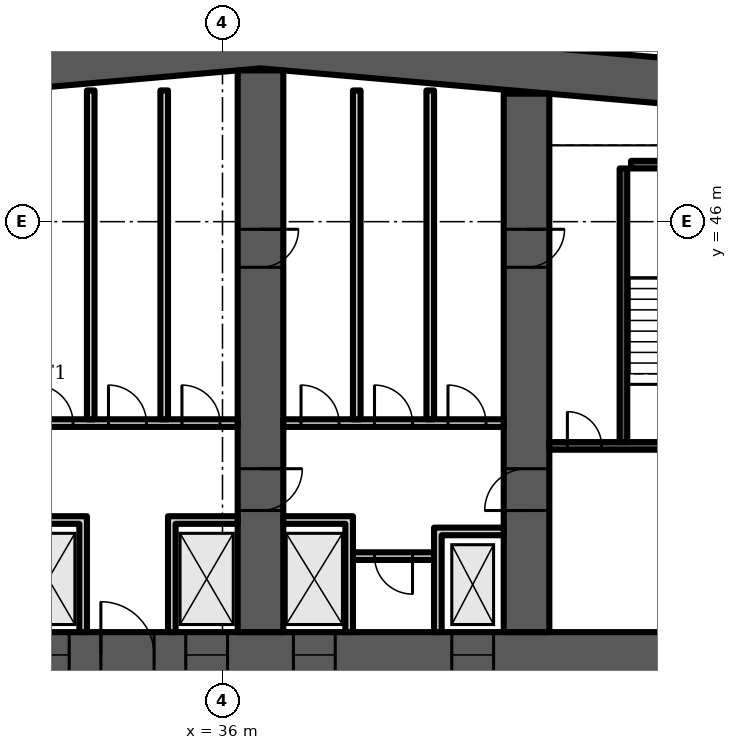
"""IFC4 building model, lengths in metres.
Left out: names, types, materials, properties, quantities, classifications, styles, units other than length and angle.
Written with IfcOpenShell. Run it as: python <this file> out.ifc"""

import sys

from ifc_helpers import new_model, si_unit, direction, frame, frame_2d, origin, place, context, subcontext, project, spatial, polyline, rectangle, outline, extrude, element, fill, save


model = new_model("IFC4")
c1 = context("Model", 3, precision=1e-05, world=origin(), true_north=direction((0.0, 1.0)))
c2 = subcontext(c1, "Body", "Model", "MODEL_VIEW")
j1 = project(units=[si_unit("LENGTHUNIT", "METRE"), si_unit("PLANEANGLEUNIT", "RADIAN")], contexts=[c1])
p1 = place(None, origin())
s1 = spatial("IfcSite", under=j1, at=p1, CompositionType="ELEMENT")
p2 = place(p1, origin())
s2 = spatial("IfcBuilding", under=s1, at=p2, CompositionType="ELEMENT")
p3 = place(p2, frame((0.0, 0.0, 63.1)))
s3 = spatial("IfcBuildingStorey", under=s2, at=p3, CompositionType="ELEMENT", Elevation=63.1)
p4 = place(p3, frame((0.0, 0.0, -0.0)))
e1 = element("IfcWall", 1, at=p4, inside=s3, PredefinedType="SHEAR", context=c2, shape_type="SweptSolid", body=[
    extrude(outline(polyline([(9.0, 47.583), (37.0, 50.032), (65.0, 47.583), (65.0, 48.787), (37.0, 51.237), (9.0, 48.787), (9.0, 47.583)])), origin(), (0.0, 0.0, 1.0), 3.6),
])
p5 = place(p3, frame((9.0, 34.6, 0.0), z_axis=(0.0, 0.0, 1.0), x_axis=(1.0, 0.0, 0.0)))
e2 = element("IfcWall", 2, at=p5, inside=s3, PredefinedType="SHEAR", context=c2, shape_type="SweptSolid", body=[
    extrude(rectangle(XDim=56.0, YDim=1.2, at=frame_2d((28.0, 0.0))), origin(), (0.0, 0.0, 1.0), 3.6),
])
p6 = place(p5, frame((3.3, 0.0, 0.0)))
e3 = element("IfcOpeningElement", 3, at=p6, cuts=e2, PredefinedType="OPENING", context=c2, shape_type="SweptSolid", body=[
    extrude(rectangle(XDim=1.0, YDim=2.1, at=frame_2d((0.5, 1.05))), frame((0.0, 0.61, 0.0), z_axis=(0.0, -1.0, 0.0), x_axis=(1.0, 0.0, 0.0)), (0.0, 0.0, 1.0), 1.22),
])
p7 = place(p5, frame((7.867, 0.0, 0.0)))
e4 = element("IfcOpeningElement", 4, at=p7, cuts=e2, PredefinedType="OPENING", context=c2, shape_type="SweptSolid", body=[
    extrude(rectangle(XDim=1.1, YDim=2.1, at=frame_2d((0.55, 1.05))), frame((0.0, 0.61, 0.0), z_axis=(0.0, -1.0, 0.0), x_axis=(1.0, 0.0, 0.0)), (0.0, 0.0, 1.0), 1.22),
])
p8 = place(p5, frame((12.033, 0.0, 0.0)))
e5 = element("IfcOpeningElement", 5, at=p8, cuts=e2, PredefinedType="OPENING", context=c2, shape_type="SweptSolid", body=[
    extrude(rectangle(XDim=1.1, YDim=2.1, at=frame_2d((0.55, 1.05))), frame((0.0, 0.61, 0.0), z_axis=(0.0, -1.0, 0.0), x_axis=(1.0, 0.0, 0.0)), (0.0, 0.0, 1.0), 1.22),
])
p9 = place(p5, frame((9.8, 0.0, 0.0)))
e6 = element("IfcOpeningElement", 6, at=p9, cuts=e2, PredefinedType="OPENING", context=c2, shape_type="SweptSolid", body=[
    extrude(rectangle(XDim=1.4, YDim=2.1, at=frame_2d((0.7, 1.05))), frame((0.0, 0.61, 0.0), z_axis=(0.0, -1.0, 0.0), x_axis=(1.0, 0.0, 0.0)), (0.0, 0.0, 1.0), 1.22),
])
p10 = place(p5, frame((14.65, 0.0, 0.0)))
e7 = element("IfcOpeningElement", 7, at=p10, cuts=e2, PredefinedType="OPENING", context=c2, shape_type="SweptSolid", body=[
    extrude(rectangle(XDim=1.2, YDim=2.1, at=frame_2d((0.6, 1.05))), frame((0.0, 0.61, 0.0), z_axis=(0.0, -1.0, 0.0), x_axis=(1.0, 0.0, 0.0)), (0.0, 0.0, 1.0), 1.22),
])
p11 = place(p5, frame((21.867, 0.0, 0.0)))
e8 = element("IfcOpeningElement", 8, at=p11, cuts=e2, PredefinedType="OPENING", context=c2, shape_type="SweptSolid", body=[
    extrude(rectangle(XDim=1.1, YDim=2.1, at=frame_2d((0.55, 1.05))), frame((0.0, 0.61, 0.0), z_axis=(0.0, -1.0, 0.0), x_axis=(1.0, 0.0, 0.0)), (0.0, 0.0, 1.0), 1.22),
])
p12 = place(p5, frame((26.033, 0.0, 0.0)))
e9 = element("IfcOpeningElement", 9, at=p12, cuts=e2, PredefinedType="OPENING", context=c2, shape_type="SweptSolid", body=[
    extrude(rectangle(XDim=1.1, YDim=2.1, at=frame_2d((0.55, 1.05))), frame((0.0, 0.61, 0.0), z_axis=(0.0, -1.0, 0.0), x_axis=(1.0, 0.0, 0.0)), (0.0, 0.0, 1.0), 1.22),
])
p13 = place(p5, frame((23.8, 0.0, 0.0)))
e10 = element("IfcOpeningElement", 10, at=p13, cuts=e2, PredefinedType="OPENING", context=c2, shape_type="SweptSolid", body=[
    extrude(rectangle(XDim=1.4, YDim=2.1, at=frame_2d((0.7, 1.05))), frame((0.0, 0.61, 0.0), z_axis=(0.0, -1.0, 0.0), x_axis=(1.0, 0.0, 0.0)), (0.0, 0.0, 1.0), 1.22),
])
p14 = place(p5, frame((28.867, 0.0, 0.0)))
e11 = element("IfcOpeningElement", 11, at=p14, cuts=e2, PredefinedType="OPENING", context=c2, shape_type="SweptSolid", body=[
    extrude(rectangle(XDim=1.1, YDim=2.1, at=frame_2d((0.55, 1.05))), frame((0.0, 0.61, 0.0), z_axis=(0.0, -1.0, 0.0), x_axis=(1.0, 0.0, 0.0)), (0.0, 0.0, 1.0), 1.22),
])
p15 = place(p5, frame((33.033, 0.0, 0.0)))
e12 = element("IfcOpeningElement", 12, at=p15, cuts=e2, PredefinedType="OPENING", context=c2, shape_type="SweptSolid", body=[
    extrude(rectangle(XDim=1.1, YDim=2.1, at=frame_2d((0.55, 1.05))), frame((0.0, 0.61, 0.0), z_axis=(0.0, -1.0, 0.0), x_axis=(1.0, 0.0, 0.0)), (0.0, 0.0, 1.0), 1.22),
])
p16 = place(p5, frame((40.15, 0.0, 0.0)))
e13 = element("IfcOpeningElement", 13, at=p16, cuts=e2, PredefinedType="OPENING", context=c2, shape_type="SweptSolid", body=[
    extrude(rectangle(XDim=1.2, YDim=2.1, at=frame_2d((0.6, 1.05))), frame((0.0, 0.61, 0.0), z_axis=(0.0, -1.0, 0.0), x_axis=(1.0, 0.0, 0.0)), (0.0, 0.0, 1.0), 1.22),
])
p17 = place(p5, frame((44.8, 0.0, 0.0)))
e14 = element("IfcOpeningElement", 14, at=p17, cuts=e2, PredefinedType="OPENING", context=c2, shape_type="SweptSolid", body=[
    extrude(rectangle(XDim=1.4, YDim=2.1, at=frame_2d((0.7, 1.05))), frame((0.0, 0.61, 0.0), z_axis=(0.0, -1.0, 0.0), x_axis=(1.0, 0.0, 0.0)), (0.0, 0.0, 1.0), 1.22),
])
p18 = place(p5, frame((49.867, 0.0, 0.0)))
e15 = element("IfcOpeningElement", 15, at=p18, cuts=e2, PredefinedType="OPENING", context=c2, shape_type="SweptSolid", body=[
    extrude(rectangle(XDim=1.1, YDim=2.1, at=frame_2d((0.55, 1.05))), frame((0.0, 0.61, 0.0), z_axis=(0.0, -1.0, 0.0), x_axis=(1.0, 0.0, 0.0)), (0.0, 0.0, 1.0), 1.22),
])
p19 = place(p5, frame((53.5, 0.0, 0.0)))
e16 = element("IfcOpeningElement", 16, at=p19, cuts=e2, PredefinedType="OPENING", context=c2, shape_type="SweptSolid", body=[
    extrude(rectangle(XDim=1.1, YDim=2.1, at=frame_2d((0.55, 1.05))), frame((0.0, 0.61, 0.0), z_axis=(0.0, -1.0, 0.0), x_axis=(1.0, 0.0, 0.0)), (0.0, 0.0, 1.0), 1.22),
])
p20 = place(p5, frame((51.567, 0.0, 0.0)))
e17 = element("IfcOpeningElement", 17, at=p20, cuts=e2, PredefinedType="OPENING", context=c2, shape_type="SweptSolid", body=[
    extrude(rectangle(XDim=1.4, YDim=2.1, at=frame_2d((0.7, 1.05))), frame((0.0, 0.61, 0.0), z_axis=(0.0, -1.0, 0.0), x_axis=(1.0, 0.0, 0.0)), (0.0, 0.0, 1.0), 1.22),
])
p21 = place(p3, frame((37.0, 35.2, 0.0), z_axis=(0.0, 0.0, 1.0), x_axis=(0.0, 1.0, 0.0)))
e18 = element("IfcWall", 18, at=p21, inside=s3, PredefinedType="SHEAR", context=c2, shape_type="SweptSolid", body=[
    extrude(rectangle(XDim=14.78, YDim=1.2, at=frame_2d((7.39, 0.0))), origin(), (0.0, 0.0, 1.0), 3.6),
])
p22 = place(p21, frame((3.2, 0.0, 0.0)))
e19 = element("IfcOpeningElement", 19, at=p22, cuts=e18, PredefinedType="OPENING", context=c2, shape_type="SweptSolid", body=[
    extrude(rectangle(XDim=1.1, YDim=2.1, at=frame_2d((0.55, 1.05))), frame((0.0, 0.61, 0.0), z_axis=(0.0, -1.0, 0.0), x_axis=(1.0, 0.0, 0.0)), (0.0, 0.0, 1.0), 1.22),
])
p23 = place(p21, frame((9.6, 0.0, 0.0)))
e20 = element("IfcOpeningElement", 20, at=p23, cuts=e18, PredefinedType="OPENING", context=c2, shape_type="SweptSolid", body=[
    extrude(rectangle(XDim=1.0, YDim=2.1, at=frame_2d((0.5, 1.05))), frame((0.0, 0.61, 0.0), z_axis=(0.0, -1.0, 0.0), x_axis=(1.0, 0.0, 0.0)), (0.0, 0.0, 1.0), 1.22),
])
p24 = place(p3, frame((44.0, 35.2, 0.0), z_axis=(0.0, 0.0, 1.0), x_axis=(0.0, 1.0, 0.0)))
e21 = element("IfcWall", 21, at=p24, inside=s3, PredefinedType="SHEAR", context=c2, shape_type="SweptSolid", body=[
    extrude(rectangle(XDim=14.168, YDim=1.2, at=frame_2d((7.084, 0.0))), origin(), (0.0, 0.0, 1.0), 3.6),
])
p25 = place(p24, frame((3.2, 0.0, 0.0)))
e22 = element("IfcOpeningElement", 22, at=p25, cuts=e21, PredefinedType="OPENING", context=c2, shape_type="SweptSolid", body=[
    extrude(rectangle(XDim=1.1, YDim=2.1, at=frame_2d((0.55, 1.05))), frame((0.0, 0.61, 0.0), z_axis=(0.0, -1.0, 0.0), x_axis=(1.0, 0.0, 0.0)), (0.0, 0.0, 1.0), 1.22),
])
p26 = place(p24, frame((9.6, 0.0, 0.0)))
e23 = element("IfcOpeningElement", 23, at=p26, cuts=e21, PredefinedType="OPENING", context=c2, shape_type="SweptSolid", body=[
    extrude(rectangle(XDim=1.0, YDim=2.1, at=frame_2d((0.5, 1.05))), frame((0.0, 0.61, 0.0), z_axis=(0.0, -1.0, 0.0), x_axis=(1.0, 0.0, 0.0)), (0.0, 0.0, 1.0), 1.22),
])
p27 = place(p3, frame((30.6, 40.7, 0.0), z_axis=(0.0, 0.0, 1.0), x_axis=(1.0, 0.0, 0.0)))
e24 = element("IfcWall", 24, at=p27, inside=s3, PredefinedType="PARTITIONING", context=c2, shape_type="SweptSolid", body=[
    extrude(rectangle(XDim=5.8, YDim=0.2, at=frame_2d((2.9, 0.0))), origin(), (0.0, 0.0, 1.0), 3.2),
])
p28 = place(p27, frame((0.467, 0.0, 0.0)))
e25 = element("IfcOpeningElement", 25, at=p28, cuts=e24, PredefinedType="OPENING", context=c2, shape_type="SweptSolid", body=[
    extrude(rectangle(XDim=1.0, YDim=2.1, at=frame_2d((0.5, 1.05))), frame((0.0, 0.11, 0.0), z_axis=(0.0, -1.0, 0.0), x_axis=(1.0, 0.0, 0.0)), (0.0, 0.0, 1.0), 0.22),
])
p29 = place(p27, frame((2.4, 0.0, 0.0)))
e26 = element("IfcOpeningElement", 26, at=p29, cuts=e24, PredefinedType="OPENING", context=c2, shape_type="SweptSolid", body=[
    extrude(rectangle(XDim=1.0, YDim=2.1, at=frame_2d((0.5, 1.05))), frame((0.0, 0.11, 0.0), z_axis=(0.0, -1.0, 0.0), x_axis=(1.0, 0.0, 0.0)), (0.0, 0.0, 1.0), 0.22),
])
p30 = place(p27, frame((4.333, 0.0, 0.0)))
e27 = element("IfcOpeningElement", 27, at=p30, cuts=e24, PredefinedType="OPENING", context=c2, shape_type="SweptSolid", body=[
    extrude(rectangle(XDim=1.0, YDim=2.1, at=frame_2d((0.5, 1.05))), frame((0.0, 0.11, 0.0), z_axis=(0.0, -1.0, 0.0), x_axis=(1.0, 0.0, 0.0)), (0.0, 0.0, 1.0), 0.22),
])
p31 = place(p3, frame((0.0, 0.0, -0.0)))
e28 = element("IfcWall", 28, at=p31, inside=s3, PredefinedType="PARTITIONING", context=c2, shape_type="SweptSolid", body=[
    extrude(outline(polyline([(32.233, 38.05), (30.6, 38.05), (30.6, 38.25), (32.233, 38.25), (32.433, 38.25), (32.433, 35.2), (32.233, 35.2), (32.233, 38.05)])), origin(), (0.0, 0.0, 1.0), 3.2),
])
p32 = place(p3, frame((0.0, 0.0, -0.0)))
e29 = element("IfcWall", 29, at=p32, inside=s3, PredefinedType="PARTITIONING", context=c2, shape_type="SweptSolid", body=[
    extrude(outline(polyline([(34.567, 38.25), (34.767, 38.25), (36.4, 38.25), (36.4, 38.05), (34.767, 38.05), (34.767, 35.2), (34.567, 35.2), (34.567, 38.25)])), origin(), (0.0, 0.0, 1.0), 3.2),
])
for number, where, z_axis, x_axis in (
    (30, (32.533, 40.8, 0.0), (0.0, 0.0, 1.0), (0.0, 1.0, 0.0)),
    (31, (34.467, 40.8, 0.0), (0.0, 0.0, 1.0), (0.0, 1.0, 0.0)),
):
    element("IfcWall", number, at=place(p3, frame(where, z_axis=z_axis, x_axis=x_axis)), inside=s3, PredefinedType="PARTITIONING", context=c2, shape_type="SweptSolid", body=[
        extrude(rectangle(XDim=8.653, YDim=0.2, at=frame_2d((4.326, 0.0))), origin(), (0.0, 0.0, 1.0), 3.2),
    ])
p33 = place(p3, frame((39.433, 37.2, 0.0), z_axis=(0.0, 0.0, 1.0), x_axis=(1.0, 0.0, 0.0)))
e32 = element("IfcWall", 32, at=p33, inside=s3, PredefinedType="PARTITIONING", context=c2, shape_type="SweptSolid", body=[
    extrude(rectangle(XDim=2.133, YDim=0.2, at=frame_2d((1.067, 0.0))), origin(), (0.0, 0.0, 1.0), 3.2),
])
p34 = place(p33, frame((0.567, 0.0, 0.0)))
e33 = element("IfcOpeningElement", 33, at=p34, cuts=e32, PredefinedType="OPENING", context=c2, shape_type="SweptSolid", body=[
    extrude(rectangle(XDim=1.0, YDim=2.1, at=frame_2d((0.5, 1.05))), frame((0.0, 0.11, 0.0), z_axis=(0.0, -1.0, 0.0), x_axis=(1.0, 0.0, 0.0)), (0.0, 0.0, 1.0), 0.22),
])
p35 = place(p3, frame((37.6, 40.7, 0.0), z_axis=(0.0, 0.0, 1.0), x_axis=(1.0, 0.0, 0.0)))
e34 = element("IfcWall", 34, at=p35, inside=s3, PredefinedType="PARTITIONING", context=c2, shape_type="SweptSolid", body=[
    extrude(rectangle(XDim=5.8, YDim=0.2, at=frame_2d((2.9, 0.0))), origin(), (0.0, 0.0, 1.0), 3.2),
])
p36 = place(p35, frame((0.467, 0.0, 0.0)))
e35 = element("IfcOpeningElement", 35, at=p36, cuts=e34, PredefinedType="OPENING", context=c2, shape_type="SweptSolid", body=[
    extrude(rectangle(XDim=1.0, YDim=2.1, at=frame_2d((0.5, 1.05))), frame((0.0, 0.11, 0.0), z_axis=(0.0, -1.0, 0.0), x_axis=(1.0, 0.0, 0.0)), (0.0, 0.0, 1.0), 0.22),
])
p37 = place(p35, frame((2.4, 0.0, 0.0)))
e36 = element("IfcOpeningElement", 36, at=p37, cuts=e34, PredefinedType="OPENING", context=c2, shape_type="SweptSolid", body=[
    extrude(rectangle(XDim=1.0, YDim=2.1, at=frame_2d((0.5, 1.05))), frame((0.0, 0.11, 0.0), z_axis=(0.0, -1.0, 0.0), x_axis=(1.0, 0.0, 0.0)), (0.0, 0.0, 1.0), 0.22),
])
p38 = place(p35, frame((4.333, 0.0, 0.0)))
e37 = element("IfcOpeningElement", 37, at=p38, cuts=e34, PredefinedType="OPENING", context=c2, shape_type="SweptSolid", body=[
    extrude(rectangle(XDim=1.0, YDim=2.1, at=frame_2d((0.5, 1.05))), frame((0.0, 0.11, 0.0), z_axis=(0.0, -1.0, 0.0), x_axis=(1.0, 0.0, 0.0)), (0.0, 0.0, 1.0), 0.22),
])
p39 = place(p3, frame((0.0, 0.0, -0.0)))
e38 = element("IfcWall", 38, at=p39, inside=s3, PredefinedType="PARTITIONING", context=c2, shape_type="SweptSolid", body=[
    extrude(outline(polyline([(41.567, 37.95), (41.767, 37.95), (43.4, 37.95), (43.4, 37.75), (41.767, 37.75), (41.767, 35.2), (41.567, 35.2), (41.567, 37.95)])), origin(), (0.0, 0.0, 1.0), 3.2),
])
p40 = place(p3, frame((0.0, 0.0, -0.0)))
e39 = element("IfcWall", 39, at=p40, inside=s3, PredefinedType="PARTITIONING", context=c2, shape_type="SweptSolid", body=[
    extrude(outline(polyline([(39.233, 38.05), (37.6, 38.05), (37.6, 38.25), (39.233, 38.25), (39.433, 38.25), (39.433, 35.2), (39.233, 35.2), (39.233, 38.05)])), origin(), (0.0, 0.0, 1.0), 3.2),
])
for number, where, z_axis, x_axis in (
    (40, (39.533, 40.8, 0.0), (0.0, 0.0, 1.0), (0.0, 1.0, 0.0)),
    (41, (41.467, 40.8, 0.0), (0.0, 0.0, 1.0), (0.0, 1.0, 0.0)),
):
    element("IfcWall", number, at=place(p3, frame(where, z_axis=z_axis, x_axis=x_axis)), inside=s3, PredefinedType="PARTITIONING", context=c2, shape_type="SweptSolid", body=[
        extrude(rectangle(XDim=8.653, YDim=0.2, at=frame_2d((4.326, 0.0))), origin(), (0.0, 0.0, 1.0), 3.2),
    ])
p41 = place(p3, frame((44.6, 40.1, 0.0), z_axis=(0.0, 0.0, 1.0), x_axis=(1.0, 0.0, 0.0)))
e42 = element("IfcWall", 42, at=p41, inside=s3, PredefinedType="SHEAR", context=c2, shape_type="SweptSolid", body=[
    extrude(rectangle(XDim=5.8, YDim=0.2, at=frame_2d((2.9, 0.0))), origin(), (0.0, 0.0, 1.0), 3.2),
])
p42 = place(p41, frame((3.325, 0.0, 0.0)))
e43 = element("IfcOpeningElement", 43, at=p42, cuts=e42, PredefinedType="OPENING", context=c2, shape_type="SweptSolid", body=[
    extrude(rectangle(XDim=1.2, YDim=2.1, at=frame_2d((0.6, 1.05))), frame((0.0, 0.11, 0.0), z_axis=(0.0, -1.0, 0.0), x_axis=(1.0, 0.0, 0.0)), (0.0, 0.0, 1.0), 0.22),
])
p43 = place(p41, frame((0.475, 0.0, 0.0)))
e44 = element("IfcOpeningElement", 44, at=p43, cuts=e42, PredefinedType="OPENING", context=c2, shape_type="SweptSolid", body=[
    extrude(rectangle(XDim=0.9, YDim=2.1, at=frame_2d((0.45, 1.05))), frame((0.0, 0.11, 0.0), z_axis=(0.0, -1.0, 0.0), x_axis=(1.0, 0.0, 0.0)), (0.0, 0.0, 1.0), 0.22),
])
p44 = place(p3, frame((46.55, 40.2, 0.0), z_axis=(0.0, 0.0, 1.0), x_axis=(0.0, 1.0, 0.0)))
e45 = element("IfcWall", 45, at=p44, inside=s3, PredefinedType="SHEAR", context=c2, shape_type="SweptSolid", body=[
    extrude(rectangle(XDim=7.2, YDim=0.2, at=frame_2d((3.6, 0.0))), origin(), (0.0, 0.0, 1.0), 3.2),
])
p45 = place(p3, frame((46.75, 47.5, 0.0), z_axis=(0.0, 0.0, 1.0), x_axis=(1.0, 0.0, 0.0)))
e46 = element("IfcWall", 46, at=p45, inside=s3, PredefinedType="SHEAR", context=c2, shape_type="SweptSolid", body=[
    extrude(rectangle(XDim=3.65, YDim=0.2, at=frame_2d((1.825, 0.0))), origin(), (0.0, 0.0, 1.0), 3.2),
])
p46 = place(p11, origin())
e47 = element("IfcDoor", 47, at=p46, inside=s3, OperationType="DOUBLE_DOOR_SLIDING", PredefinedType="DOOR", context=c2, shape_type="SweptSolid", body=[
    extrude(rectangle(XDim=1.1, YDim=2.1, at=frame_2d((0.55, 1.05))), frame((0.0, 0.025, 0.0), z_axis=(0.0, -1.0, 0.0), x_axis=(1.0, 0.0, 0.0)), (0.0, 0.0, 1.0), 0.05),
])
fill(e8, e47)
p47 = place(p12, origin())
e48 = element("IfcDoor", 48, at=p47, inside=s3, OperationType="DOUBLE_DOOR_SLIDING", PredefinedType="DOOR", context=c2, shape_type="SweptSolid", body=[
    extrude(rectangle(XDim=1.1, YDim=2.1, at=frame_2d((0.55, 1.05))), frame((0.0, 0.025, 0.0), z_axis=(0.0, -1.0, 0.0), x_axis=(1.0, 0.0, 0.0)), (0.0, 0.0, 1.0), 0.05),
])
fill(e9, e48)
p48 = place(p13, origin())
e49 = element("IfcDoor", 49, at=p48, inside=s3, OperationType="DOUBLE_DOOR_SINGLE_SWING", PredefinedType="DOOR", context=c2, shape_type="SweptSolid", body=[
    extrude(rectangle(XDim=1.4, YDim=2.1, at=frame_2d((0.7, 1.05))), frame((0.0, 0.025, 0.0), z_axis=(0.0, -1.0, 0.0), x_axis=(1.0, 0.0, 0.0)), (0.0, 0.0, 1.0), 0.05),
])
fill(e10, e49)
p49 = place(p28, origin())
e50 = element("IfcDoor", 50, at=p49, inside=s3, OperationType="SINGLE_SWING_LEFT", PredefinedType="DOOR", context=c2, shape_type="SweptSolid", body=[
    extrude(rectangle(XDim=1.0, YDim=2.1, at=frame_2d((0.5, 1.05))), frame((0.0, 0.025, 0.0), z_axis=(0.0, -1.0, 0.0), x_axis=(1.0, 0.0, 0.0)), (0.0, 0.0, 1.0), 0.05),
])
fill(e25, e50)
p50 = place(p29, origin())
e51 = element("IfcDoor", 51, at=p50, inside=s3, OperationType="SINGLE_SWING_LEFT", PredefinedType="DOOR", context=c2, shape_type="SweptSolid", body=[
    extrude(rectangle(XDim=1.0, YDim=2.1, at=frame_2d((0.5, 1.05))), frame((0.0, 0.025, 0.0), z_axis=(0.0, -1.0, 0.0), x_axis=(1.0, 0.0, 0.0)), (0.0, 0.0, 1.0), 0.05),
])
fill(e26, e51)
p51 = place(p30, origin())
e52 = element("IfcDoor", 52, at=p51, inside=s3, OperationType="SINGLE_SWING_LEFT", PredefinedType="DOOR", context=c2, shape_type="SweptSolid", body=[
    extrude(rectangle(XDim=1.0, YDim=2.1, at=frame_2d((0.5, 1.05))), frame((0.0, 0.025, 0.0), z_axis=(0.0, -1.0, 0.0), x_axis=(1.0, 0.0, 0.0)), (0.0, 0.0, 1.0), 0.05),
])
fill(e27, e52)
p52 = place(p34, origin())
e53 = element("IfcDoor", 53, at=p52, inside=s3, OperationType="SINGLE_SWING_RIGHT", PredefinedType="DOOR", context=c2, shape_type="SweptSolid", body=[
    extrude(rectangle(XDim=1.0, YDim=2.1, at=frame_2d((0.5, 1.05))), frame((0.0, 0.025, 0.0), z_axis=(0.0, -1.0, 0.0), x_axis=(1.0, 0.0, 0.0)), (0.0, 0.0, 1.0), 0.05),
])
fill(e33, e53)
p53 = place(p14, origin())
e54 = element("IfcDoor", 54, at=p53, inside=s3, OperationType="DOUBLE_DOOR_SLIDING", PredefinedType="DOOR", context=c2, shape_type="SweptSolid", body=[
    extrude(rectangle(XDim=1.1, YDim=2.1, at=frame_2d((0.55, 1.05))), frame((0.0, 0.025, 0.0), z_axis=(0.0, -1.0, 0.0), x_axis=(1.0, 0.0, 0.0)), (0.0, 0.0, 1.0), 0.05),
])
fill(e11, e54)
p54 = place(p15, origin())
e55 = element("IfcDoor", 55, at=p54, inside=s3, OperationType="DOUBLE_DOOR_SLIDING", PredefinedType="DOOR", context=c2, shape_type="SweptSolid", body=[
    extrude(rectangle(XDim=1.1, YDim=2.1, at=frame_2d((0.55, 1.05))), frame((0.0, 0.025, 0.0), z_axis=(0.0, -1.0, 0.0), x_axis=(1.0, 0.0, 0.0)), (0.0, 0.0, 1.0), 0.05),
])
fill(e12, e55)
p55 = place(p36, origin())
e56 = element("IfcDoor", 56, at=p55, inside=s3, OperationType="SINGLE_SWING_LEFT", PredefinedType="DOOR", context=c2, shape_type="SweptSolid", body=[
    extrude(rectangle(XDim=1.0, YDim=2.1, at=frame_2d((0.5, 1.05))), frame((0.0, 0.025, 0.0), z_axis=(0.0, -1.0, 0.0), x_axis=(1.0, 0.0, 0.0)), (0.0, 0.0, 1.0), 0.05),
])
fill(e35, e56)
p56 = place(p37, origin())
e57 = element("IfcDoor", 57, at=p56, inside=s3, OperationType="SINGLE_SWING_LEFT", PredefinedType="DOOR", context=c2, shape_type="SweptSolid", body=[
    extrude(rectangle(XDim=1.0, YDim=2.1, at=frame_2d((0.5, 1.05))), frame((0.0, 0.025, 0.0), z_axis=(0.0, -1.0, 0.0), x_axis=(1.0, 0.0, 0.0)), (0.0, 0.0, 1.0), 0.05),
])
fill(e36, e57)
p57 = place(p38, origin())
e58 = element("IfcDoor", 58, at=p57, inside=s3, OperationType="SINGLE_SWING_LEFT", PredefinedType="DOOR", context=c2, shape_type="SweptSolid", body=[
    extrude(rectangle(XDim=1.0, YDim=2.1, at=frame_2d((0.5, 1.05))), frame((0.0, 0.025, 0.0), z_axis=(0.0, -1.0, 0.0), x_axis=(1.0, 0.0, 0.0)), (0.0, 0.0, 1.0), 0.05),
])
fill(e37, e58)
p58 = place(p43, origin())
e59 = element("IfcDoor", 59, at=p58, inside=s3, OperationType="SINGLE_SWING_LEFT", PredefinedType="DOOR", context=c2, shape_type="SweptSolid", body=[
    extrude(rectangle(XDim=0.9, YDim=2.1, at=frame_2d((0.45, 1.05))), frame((0.0, 0.025, 0.0), z_axis=(0.0, -1.0, 0.0), x_axis=(1.0, 0.0, 0.0)), (0.0, 0.0, 1.0), 0.05),
])
fill(e44, e59)
p59 = place(p22, origin())
e60 = element("IfcDoor", 60, at=p59, inside=s3, OperationType="SINGLE_SWING_RIGHT", PredefinedType="DOOR", context=c2, shape_type="SweptSolid", body=[
    extrude(rectangle(XDim=1.1, YDim=2.1, at=frame_2d((0.55, 1.05))), frame((0.0, 0.025, 0.0), z_axis=(0.0, -1.0, 0.0), x_axis=(1.0, 0.0, 0.0)), (0.0, 0.0, 1.0), 0.05),
])
fill(e19, e60)
p60 = place(p23, origin())
e61 = element("IfcDoor", 61, at=p60, inside=s3, OperationType="SINGLE_SWING_RIGHT", PredefinedType="DOOR", context=c2, shape_type="SweptSolid", body=[
    extrude(rectangle(XDim=1.0, YDim=2.1, at=frame_2d((0.5, 1.05))), frame((0.0, 0.6, 0.0), z_axis=(0.0, -1.0, 0.0), x_axis=(1.0, 0.0, 0.0)), (0.0, 0.0, 1.0), 1.199),
])
fill(e20, e61)
p61 = place(p25, origin())
e62 = element("IfcDoor", 62, at=p61, inside=s3, OperationType="SINGLE_SWING_LEFT", PredefinedType="DOOR", context=c2, shape_type="SweptSolid", body=[
    extrude(rectangle(XDim=1.1, YDim=2.1, at=frame_2d((0.55, 1.05))), frame((0.0, 0.025, 0.0), z_axis=(0.0, -1.0, 0.0), x_axis=(1.0, 0.0, 0.0)), (0.0, 0.0, 1.0), 0.05),
])
fill(e22, e62)
p62 = place(p26, origin())
e63 = element("IfcDoor", 63, at=p62, inside=s3, OperationType="SINGLE_SWING_RIGHT", PredefinedType="DOOR", context=c2, shape_type="SweptSolid", body=[
    extrude(rectangle(XDim=1.0, YDim=2.1, at=frame_2d((0.5, 1.05))), frame((0.0, 0.6, 0.0), z_axis=(0.0, -1.0, 0.0), x_axis=(1.0, 0.0, 0.0)), (0.0, 0.0, 1.0), 1.199),
])
fill(e23, e63)
save(model, sys.argv[1])
